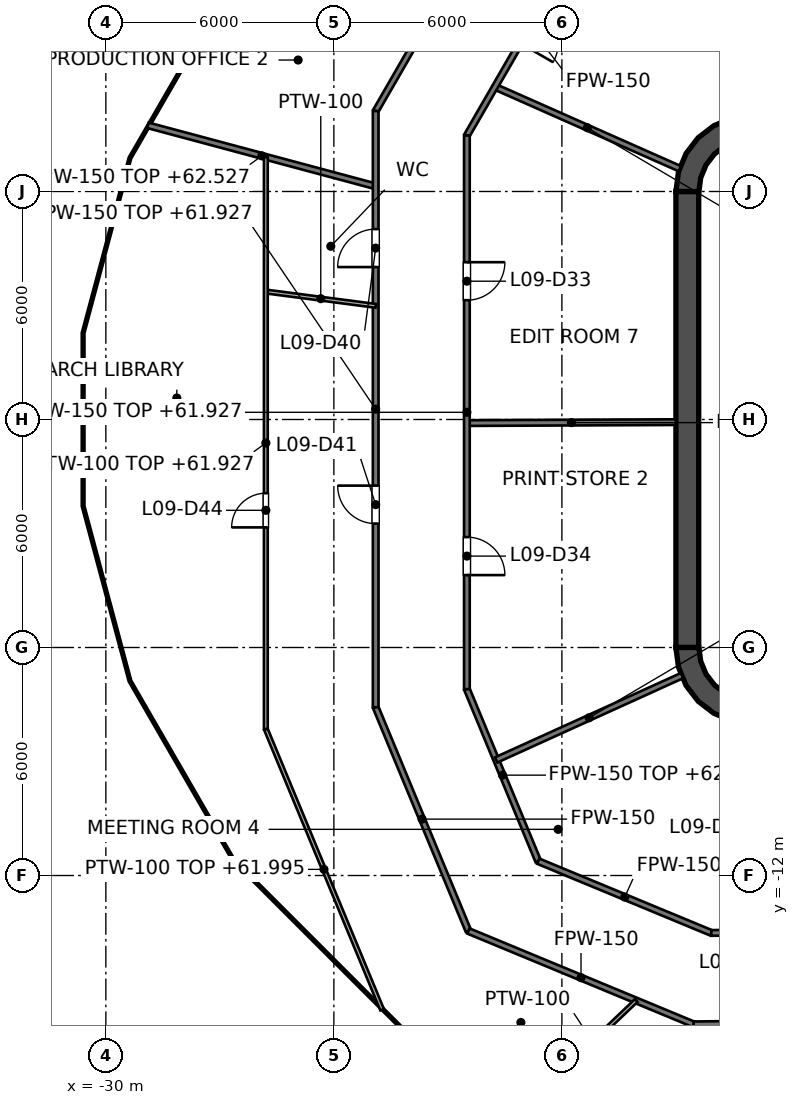
"""IFC4 building model, lengths in metres.
Left out: names, types, materials, properties, quantities, classifications, styles, units other than length and angle.
Written with IfcOpenShell. Run it as: python <this file> out.ifc"""

import sys

from ifc_helpers import new_model, si_unit, direction, frame, frame_2d, origin, place, context, subcontext, project, spatial, polyline, rectangle, outline, extrude, element, fill, save


model = new_model("IFC4")
c1 = context("Model", 3, precision=1e-05, world=origin(), true_north=direction((0.0, 1.0)))
c2 = subcontext(c1, "Body", "Model", "MODEL_VIEW")
j1 = project(units=[si_unit("LENGTHUNIT", "METRE"), si_unit("PLANEANGLEUNIT", "RADIAN")], contexts=[c1])
p1 = place(None, origin())
s1 = spatial("IfcSite", under=j1, at=p1, CompositionType="ELEMENT")
p2 = place(p1, origin())
s2 = spatial("IfcBuilding", under=s1, at=p2, CompositionType="ELEMENT")
p3 = place(p2, frame((0.0, 0.0, 58.8)))
s3 = spatial("IfcBuildingStorey", under=s2, at=p3, CompositionType="ELEMENT", Elevation=58.8)
p4 = place(p3, frame((-14.7, -6.0, 0.0), z_axis=(0.0, 0.0, 1.0), x_axis=(0.0, 1.0, 0.0)))
e1 = element("IfcWall", 1, at=p4, inside=s3, PredefinedType="SHEAR", context=c2, shape_type="SweptSolid", body=[
    extrude(rectangle(XDim=12.0, YDim=0.6, at=frame_2d((6.0, 0.0))), origin(), (0.0, 0.0, 1.0), 4.2),
])
p5 = place(p3, origin())
e2 = element("IfcWall", 2, at=p5, inside=s3, PredefinedType="SHEAR", context=c2, shape_type="SweptSolid", body=[
    extrude(outline(polyline([(-15.0, 6.0), (-14.395, 6.0), (-14.347, 6.361), (-14.208, 6.698), (-13.986, 6.986), (-13.698, 7.208), (-13.361, 7.347), (-13.0, 7.395), (-13.0, 8.0), (-13.518, 7.932), (-14.0, 7.732), (-14.414, 7.414), (-14.732, 7.0), (-14.932, 6.518), (-15.0, 6.0)])), origin(), (0.0, 0.0, 1.0), 4.2),
])
e3 = element("IfcWall", 3, at=p5, inside=s3, PredefinedType="SHEAR", context=c2, shape_type="SweptSolid", body=[
    extrude(outline(polyline([(-13.0, -8.0), (-13.0, -7.395), (-13.361, -7.347), (-13.698, -7.208), (-13.986, -6.986), (-14.208, -6.698), (-14.347, -6.361), (-14.395, -6.0), (-15.0, -6.0), (-14.932, -6.518), (-14.732, -7.0), (-14.414, -7.414), (-14.0, -7.732), (-13.518, -7.932), (-13.0, -8.0)])), origin(), (0.0, 0.0, 1.0), 4.2),
])
e4 = element("IfcWall", 4, at=p5, inside=s3, PredefinedType="SOLIDWALL", context=c2, shape_type="SweptSolid", body=[
    extrude(outline(polyline([(-12.0, -5.925), (-12.0, -5.675), (-14.15, -5.675), (-14.15, -3.025), (-12.0, -3.025), (-12.0, -2.775), (-14.15, -2.775), (-14.15, -0.125), (-12.0, -0.125), (-12.0, 0.125), (-14.15, 0.125), (-14.15, 2.775), (-12.0, 2.775), (-12.0, 3.025), (-14.15, 3.025), (-14.15, 5.675), (-12.0, 5.675), (-12.0, 5.925), (-14.15, 5.925), (-14.4, 5.925), (-14.4, 5.675), (-14.4, 3.025), (-14.4, 2.775), (-14.4, 0.125), (-14.4, -0.125), (-14.4, -2.775), (-14.4, -3.025), (-14.4, -5.675), (-14.4, -5.925), (-14.15, -5.925), (-12.0, -5.925)])), origin(), (0.0, 0.0, 1.0), 4.05),
])
p6 = place(p3, frame((-22.9, -7.572, 0.0), z_axis=(0.0, 0.0, 1.0), x_axis=(0.382860357704, -0.923806227788, 0.0)))
e5 = element("IfcWall", 5, at=p6, inside=s3, PredefinedType="PARTITIONING", context=c2, shape_type="SweptSolid", body=[
    extrude(rectangle(XDim=6.374, YDim=0.15, at=frame_2d((3.187, 0.0))), origin(), (0.0, 0.0, 1.0), 3.195),
])
p7 = place(p3, frame((-20.5, -7.095, 0.0), z_axis=(0.0, 0.0, 1.0), x_axis=(0.382878184095, -0.923798839653, 0.0)))
e6 = element("IfcWall", 6, at=p7, inside=s3, PredefinedType="PARTITIONING", context=c2, shape_type="SweptSolid", body=[
    extrude(rectangle(XDim=4.902, YDim=0.15, at=frame_2d((2.451, 0.0))), origin(), (0.0, 0.0, 1.0), 3.276),
])
p8 = place(p3, frame((-19.76, 8.755, 0.0), z_axis=(0.0, 0.0, 1.0), x_axis=(0.91424834547, -0.405154245695, 0.0)))
e7 = element("IfcWall", 7, at=p8, inside=s3, PredefinedType="PARTITIONING", context=c2, shape_type="SweptSolid", body=[
    extrude(rectangle(XDim=5.318, YDim=0.15, at=frame_2d((2.659, 0.0))), origin(), (0.0, 0.0, 1.0), 3.276),
])
p9 = place(p3, frame((-20.46, -13.46, 0.0), z_axis=(0.0, 0.0, 1.0), x_axis=(0.9237825057, -0.382917591869, 0.0)))
e8 = element("IfcWall", 8, at=p9, inside=s3, PredefinedType="PARTITIONING", context=c2, shape_type="SweptSolid", body=[
    extrude(rectangle(XDim=6.415, YDim=0.15, at=frame_2d((3.208, 0.0))), origin(), (0.0, 0.0, 1.0), 3.195),
])
p10 = place(p3, frame((-18.623, -11.623, 0.0), z_axis=(0.0, 0.0, 1.0), x_axis=(0.923791670587, -0.38289548098, 0.0)))
e9 = element("IfcWall", 9, at=p10, inside=s3, PredefinedType="PARTITIONING", context=c2, shape_type="SweptSolid", body=[
    extrude(rectangle(XDim=4.931, YDim=0.15, at=frame_2d((2.465, 0.0))), origin(), (0.0, 0.0, 1.0), 3.195),
])
p11 = place(p3, frame((-28.891, 7.741, 0.0), z_axis=(0.0, 0.0, 1.0), x_axis=(0.965940321577, -0.258764941893, 0.0)))
e10 = element("IfcWall", 10, at=p11, inside=s3, PredefinedType="PARTITIONING", context=c2, shape_type="SweptSolid", body=[
    extrude(rectangle(XDim=6.202, YDim=0.15, at=frame_2d((3.101, 0.0))), origin(), (0.0, 0.0, 1.0), 3.727),
])
p12 = place(p3, frame((-20.5, -0.094, 0.0), z_axis=(0.0, 0.0, 1.0), x_axis=(0.999990148138, 0.004438876723, 0.0)))
e11 = element("IfcWall", 11, at=p12, inside=s3, PredefinedType="PARTITIONING", context=c2, shape_type="SweptSolid", body=[
    extrude(rectangle(XDim=5.5, YDim=0.15, at=frame_2d((2.75, 0.0))), origin(), (0.0, 0.0, 1.0), 3.127),
])
p13 = place(p3, frame((-14.534, -15.916, 0.0), z_axis=(0.0, 0.0, 1.0), x_axis=(0.999950637767, 0.009935896005, 0.0)))
e12 = element("IfcWall", 12, at=p13, inside=s3, PredefinedType="PARTITIONING", context=c2, shape_type="SweptSolid", body=[
    extrude(rectangle(XDim=33.123, YDim=0.15, at=frame_2d((16.561, 0.0))), origin(), (0.0, 0.0, 1.0), 3.127),
])
p14 = place(p13, frame((0.713, 0.0, 0.0)))
e13 = element("IfcOpeningElement", 13, at=p14, cuts=e12, PredefinedType="OPENING", context=c2, shape_type="SweptSolid", body=[
    extrude(rectangle(XDim=1.0, YDim=2.1, at=frame_2d((0.5, 1.05))), frame((0.0, 0.075, 0.0), z_axis=(0.0, -1.0, 0.0), x_axis=(1.0, 0.0, 0.0)), (0.0, 0.0, 1.0), 0.15),
])
p15 = place(p13, frame((3.349, 0.0, 0.0)))
e14 = element("IfcOpeningElement", 14, at=p15, cuts=e12, PredefinedType="OPENING", context=c2, shape_type="SweptSolid", body=[
    extrude(rectangle(XDim=1.0, YDim=2.1, at=frame_2d((0.5, 1.05))), frame((0.0, 0.075, 0.0), z_axis=(0.0, -1.0, 0.0), x_axis=(1.0, 0.0, 0.0)), (0.0, 0.0, 1.0), 0.15),
])
p16 = place(p13, frame((16.111, 0.0, 0.0)))
e15 = element("IfcOpeningElement", 15, at=p16, cuts=e12, PredefinedType="OPENING", context=c2, shape_type="SweptSolid", body=[
    extrude(rectangle(XDim=1.0, YDim=2.1, at=frame_2d((0.5, 1.05))), frame((0.0, 0.075, 0.0), z_axis=(0.0, -1.0, 0.0), x_axis=(1.0, 0.0, 0.0)), (0.0, 0.0, 1.0), 0.15),
])
p17 = place(p13, frame((25.386, 0.0, 0.0)))
e16 = element("IfcOpeningElement", 16, at=p17, cuts=e12, PredefinedType="OPENING", context=c2, shape_type="SweptSolid", body=[
    extrude(rectangle(XDim=1.0, YDim=2.1, at=frame_2d((0.5, 1.05))), frame((0.0, 0.075, 0.0), z_axis=(0.0, -1.0, 0.0), x_axis=(1.0, 0.0, 0.0)), (0.0, 0.0, 1.0), 0.15),
])
p18 = place(p3, frame((-14.068, -13.511, 0.0), z_axis=(0.0, 0.0, 1.0), x_axis=(0.999950911515, 0.009908307647, 0.0)))
e17 = element("IfcWall", 17, at=p18, inside=s3, PredefinedType="PARTITIONING", context=c2, shape_type="SweptSolid", body=[
    extrude(rectangle(XDim=2.168, YDim=0.15, at=frame_2d((1.084, 0.0))), origin(), (0.0, 0.0, 1.0), 3.195),
])
p19 = place(p3, frame((-19.728, -8.958, 0.0), z_axis=(0.0, 0.0, 1.0), x_axis=(0.910629511797, 0.413223779863, 0.0)))
e18 = element("IfcWall", 18, at=p19, inside=s3, PredefinedType="PARTITIONING", context=c2, shape_type="SweptSolid", body=[
    extrude(rectangle(XDim=5.368, YDim=0.15, at=frame_2d((2.684, 0.0))), origin(), (0.0, 0.0, 1.0), 4.05),
])
p20 = place(p3, frame((-20.5, 7.474, 0.0), z_axis=(0.0, 0.0, 1.0), x_axis=(0.500012665616, 0.866018091164, 0.0)))
e19 = element("IfcWall", 19, at=p20, inside=s3, PredefinedType="PARTITIONING", context=c2, shape_type="SweptSolid", body=[
    extrude(rectangle(XDim=6.602, YDim=0.15, at=frame_2d((3.301, 0.0))), origin(), (0.0, 0.0, 1.0), 3.195),
])
p21 = place(p20, frame((2.803, 0.0, 0.0)))
e20 = element("IfcOpeningElement", 20, at=p21, cuts=e19, PredefinedType="OPENING", context=c2, shape_type="SweptSolid", body=[
    extrude(rectangle(XDim=1.0, YDim=2.1, at=frame_2d((0.5, 1.05))), frame((0.0, 0.075, 0.0), z_axis=(0.0, -1.0, 0.0), x_axis=(1.0, 0.0, 0.0)), (0.0, 0.0, 1.0), 0.15),
])
p22 = place(p3, frame((-22.9, 8.117, 0.0), z_axis=(0.0, 0.0, 1.0), x_axis=(0.500017275495, 0.866015429543, 0.0)))
e21 = element("IfcWall", 21, at=p22, inside=s3, PredefinedType="PARTITIONING", context=c2, shape_type="SweptSolid", body=[
    extrude(rectangle(XDim=8.626, YDim=0.15, at=frame_2d((4.313, 0.0))), origin(), (0.0, 0.0, 1.0), 3.195),
])
p23 = place(p22, frame((3.813, 0.0, 0.0)))
e22 = element("IfcOpeningElement", 22, at=p23, cuts=e21, PredefinedType="OPENING", context=c2, shape_type="SweptSolid", body=[
    extrude(rectangle(XDim=1.0, YDim=2.1, at=frame_2d((0.5, 1.05))), frame((0.0, 0.075, 0.0), z_axis=(0.0, -1.0, 0.0), x_axis=(1.0, 0.0, 0.0)), (0.0, 0.0, 1.0), 0.15),
])
p24 = place(p3, frame((-20.5, -7.095, 0.0), z_axis=(0.0, 0.0, 1.0), x_axis=(0.0, 1.0, 0.0)))
e23 = element("IfcWall", 23, at=p24, inside=s3, PredefinedType="PARTITIONING", context=c2, shape_type="SweptSolid", body=[
    extrude(rectangle(XDim=14.569, YDim=0.15, at=frame_2d((7.285, 0.0))), origin(), (0.0, 0.0, 1.0), 3.127),
])
p25 = place(p24, frame((10.234, 0.0, 0.0)))
e24 = element("IfcOpeningElement", 24, at=p25, cuts=e23, PredefinedType="OPENING", context=c2, shape_type="SweptSolid", body=[
    extrude(rectangle(XDim=1.0, YDim=2.1, at=frame_2d((0.5, 1.05))), frame((0.0, 0.075, 0.0), z_axis=(0.0, -1.0, 0.0), x_axis=(1.0, 0.0, 0.0)), (0.0, 0.0, 1.0), 0.15),
])
p26 = place(p24, frame((3.0, 0.0, 0.0)))
e25 = element("IfcOpeningElement", 25, at=p26, cuts=e23, PredefinedType="OPENING", context=c2, shape_type="SweptSolid", body=[
    extrude(rectangle(XDim=1.0, YDim=2.1, at=frame_2d((0.5, 1.05))), frame((0.0, 0.075, 0.0), z_axis=(0.0, -1.0, 0.0), x_axis=(1.0, 0.0, 0.0)), (0.0, 0.0, 1.0), 0.15),
])
p27 = place(p3, frame((-22.9, -7.572, 0.0), z_axis=(0.0, 0.0, 1.0), x_axis=(0.0, 1.0, 0.0)))
e26 = element("IfcWall", 26, at=p27, inside=s3, PredefinedType="PARTITIONING", context=c2, shape_type="SweptSolid", body=[
    extrude(rectangle(XDim=15.689, YDim=0.15, at=frame_2d((7.844, 0.0))), origin(), (0.0, 0.0, 1.0), 3.127),
])
p28 = place(p27, frame((11.583, 0.0, 0.0)))
e27 = element("IfcOpeningElement", 27, at=p28, cuts=e26, PredefinedType="OPENING", context=c2, shape_type="SweptSolid", body=[
    extrude(rectangle(XDim=1.0, YDim=2.1, at=frame_2d((0.5, 1.05))), frame((0.0, 0.075, 0.0), z_axis=(0.0, -1.0, 0.0), x_axis=(1.0, 0.0, 0.0)), (0.0, 0.0, 1.0), 0.15),
])
p29 = place(p27, frame((4.832, 0.0, 0.0)))
e28 = element("IfcOpeningElement", 28, at=p29, cuts=e26, PredefinedType="OPENING", context=c2, shape_type="SweptSolid", body=[
    extrude(rectangle(XDim=1.0, YDim=2.1, at=frame_2d((0.5, 1.05))), frame((0.0, 0.075, 0.0), z_axis=(0.0, -1.0, 0.0), x_axis=(1.0, 0.0, 0.0)), (0.0, 0.0, 1.0), 0.15),
])
p30 = place(p3, frame((-25.79, -8.147, 0.0), z_axis=(0.0, 0.0, 1.0), x_axis=(0.3827816734, -0.923838833623, 0.0)))
e29 = element("IfcWall", 29, at=p30, inside=s3, PredefinedType="PARTITIONING", context=c2, shape_type="SweptSolid", body=[
    extrude(rectangle(XDim=7.992, YDim=0.1, at=frame_2d((3.996, 0.0))), origin(), (0.0, 0.0, 1.0), 3.195),
])
p31 = place(p3, frame((-25.79, 3.368, 0.0), z_axis=(0.0, 0.0, 1.0), x_axis=(0.991601345334, -0.129332022064, 0.0)))
e30 = element("IfcWall", 30, at=p31, inside=s3, PredefinedType="PARTITIONING", context=c2, shape_type="SweptSolid", body=[
    extrude(rectangle(XDim=2.915, YDim=0.1, at=frame_2d((1.457, 0.0))), origin(), (0.0, 0.0, 1.0), 4.05),
])
p32 = place(p3, frame((-18.332, -17.471, 0.0), z_axis=(0.0, 0.0, 1.0), x_axis=(0.723856845345, 0.689950192005, 0.0)))
e31 = element("IfcWall", 31, at=p32, inside=s3, PredefinedType="PARTITIONING", context=c2, shape_type="SweptSolid", body=[
    extrude(rectangle(XDim=3.161, YDim=0.1, at=frame_2d((1.581, 0.0))), origin(), (0.0, 0.0, 1.0), 4.05),
])
p33 = place(p3, frame((-14.328, -18.804, 0.0), z_axis=(0.0, 0.0, 1.0), x_axis=(0.606117553719, 0.795375075718, 0.0)))
e32 = element("IfcWall", 32, at=p33, inside=s3, PredefinedType="PARTITIONING", context=c2, shape_type="SweptSolid", body=[
    extrude(rectangle(XDim=3.661, YDim=0.1, at=frame_2d((1.831, 0.0))), origin(), (0.0, 0.0, 1.0), 4.05),
])
p34 = place(p3, frame((-25.79, -8.147, 0.0), z_axis=(0.0, 0.0, 1.0), x_axis=(0.0, 1.0, 0.0)))
e33 = element("IfcWall", 33, at=p34, inside=s3, PredefinedType="PARTITIONING", context=c2, shape_type="SweptSolid", body=[
    extrude(rectangle(XDim=15.057, YDim=0.1, at=frame_2d((7.528, 0.0))), origin(), (0.0, 0.0, 1.0), 3.127),
])
p35 = place(p34, frame((5.308, 0.0, 0.0)))
e34 = element("IfcOpeningElement", 34, at=p35, cuts=e33, PredefinedType="OPENING", context=c2, shape_type="SweptSolid", body=[
    extrude(rectangle(XDim=0.9, YDim=2.1, at=frame_2d((0.45, 1.05))), frame((0.0, 0.05, 0.0), z_axis=(0.0, -1.0, 0.0), x_axis=(1.0, 0.0, 0.0)), (0.0, 0.0, 1.0), 0.1),
])
p36 = place(p25, origin())
e35 = element("IfcDoor", 35, at=p36, inside=s3, OperationType="SINGLE_SWING_RIGHT", PredefinedType="DOOR", context=c2, shape_type="SweptSolid", body=[
    extrude(rectangle(XDim=1.0, YDim=2.1, at=frame_2d((0.5, 1.05))), frame((0.0, 0.025, 0.0), z_axis=(0.0, -1.0, 0.0), x_axis=(1.0, 0.0, 0.0)), (0.0, 0.0, 1.0), 0.05),
])
fill(e24, e35)
p37 = place(p26, origin())
e36 = element("IfcDoor", 36, at=p37, inside=s3, OperationType="SINGLE_SWING_LEFT", PredefinedType="DOOR", context=c2, shape_type="SweptSolid", body=[
    extrude(rectangle(XDim=1.0, YDim=2.1, at=frame_2d((0.5, 1.05))), frame((0.0, 0.025, 0.0), z_axis=(0.0, -1.0, 0.0), x_axis=(1.0, 0.0, 0.0)), (0.0, 0.0, 1.0), 0.05),
])
fill(e25, e36)
p38 = place(p28, origin())
e37 = element("IfcDoor", 37, at=p38, inside=s3, OperationType="SINGLE_SWING_LEFT", PredefinedType="DOOR", context=c2, shape_type="SweptSolid", body=[
    extrude(rectangle(XDim=1.0, YDim=2.1, at=frame_2d((0.5, 1.05))), frame((0.0, 0.025, 0.0), z_axis=(0.0, -1.0, 0.0), x_axis=(1.0, 0.0, 0.0)), (0.0, 0.0, 1.0), 0.05),
])
fill(e27, e37)
p39 = place(p29, origin())
e38 = element("IfcDoor", 38, at=p39, inside=s3, OperationType="SINGLE_SWING_RIGHT", PredefinedType="DOOR", context=c2, shape_type="SweptSolid", body=[
    extrude(rectangle(XDim=1.0, YDim=2.1, at=frame_2d((0.5, 1.05))), frame((0.0, 0.025, 0.0), z_axis=(0.0, -1.0, 0.0), x_axis=(1.0, 0.0, 0.0)), (0.0, 0.0, 1.0), 0.05),
])
fill(e28, e38)
p40 = place(p35, origin())
e39 = element("IfcDoor", 39, at=p40, inside=s3, OperationType="SINGLE_SWING_LEFT", PredefinedType="DOOR", context=c2, shape_type="SweptSolid", body=[
    extrude(rectangle(XDim=0.9, YDim=2.1, at=frame_2d((0.45, 1.05))), frame((0.0, 0.025, 0.0), z_axis=(0.0, -1.0, 0.0), x_axis=(1.0, 0.0, 0.0)), (0.0, 0.0, 1.0), 0.05),
])
fill(e34, e39)
save(model, sys.argv[1])
